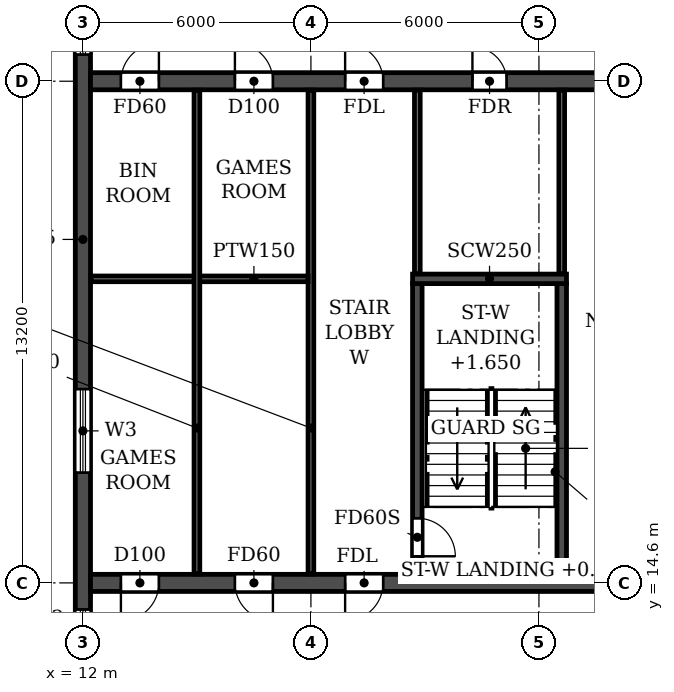
"""IFC4 building model, lengths in metres.
Left out: names, types, materials, properties, quantities, classifications, styles, units other than length and angle.
Written with IfcOpenShell. Run it as: python <this file> out.ifc"""

import sys

from ifc_helpers import new_model, si_unit, direction, frame, frame_2d, origin, place, context, subcontext, project, spatial, rectangle, extrude, element, fill, save


model = new_model("IFC4")
c1 = context("Model", 3, precision=1e-05, world=origin(), true_north=direction((0.0, 1.0)))
c2 = subcontext(c1, "Body", "Model", "MODEL_VIEW")
j1 = project(units=[si_unit("LENGTHUNIT", "METRE"), si_unit("PLANEANGLEUNIT", "RADIAN")], contexts=[c1])
p1 = place(None, origin())
s1 = spatial("IfcSite", under=j1, at=p1, CompositionType="ELEMENT")
p2 = place(p1, origin())
s2 = spatial("IfcBuilding", under=s1, at=p2, CompositionType="ELEMENT")
p3 = place(p2, frame((0.0, 0.0, 125.7)))
s3 = spatial("IfcBuildingStorey", under=s2, at=p3, CompositionType="ELEMENT", Elevation=125.7)
p4 = place(p3, frame((12.0, 4.683, 0.0), z_axis=(0.0, 0.0, 1.0), x_axis=(0.0, 1.0, 0.0)))
e1 = element("IfcWall", 1, at=p4, inside=s3, PredefinedType="SHEAR", context=c2, shape_type="SweptSolid", body=[
    extrude(rectangle(XDim=33.034, YDim=0.4, at=frame_2d((16.517, 0.0))), origin(), (0.0, 0.0, 1.0), 3.07),
])
p5 = place(p4, frame((23.817, 0.0, 0.9)))
e2 = element("IfcOpeningElement", 2, at=p5, cuts=e1, PredefinedType="OPENING", context=c2, shape_type="SweptSolid", body=[
    extrude(rectangle(XDim=1.2, YDim=1.5, at=frame_2d((0.6, 0.75))), frame((0.0, 0.21, 0.0), z_axis=(0.0, -1.0, 0.0), x_axis=(1.0, 0.0, 0.0)), (0.0, 0.0, 1.0), 0.42),
])
p6 = place(p4, frame((8.017, 0.0, 0.9)))
e3 = element("IfcOpeningElement", 3, at=p6, cuts=e1, PredefinedType="OPENING", context=c2, shape_type="SweptSolid", body=[
    extrude(rectangle(XDim=1.2, YDim=1.5, at=frame_2d((0.6, 0.75))), frame((0.0, 0.21, 0.0), z_axis=(0.0, -1.0, 0.0), x_axis=(1.0, 0.0, 0.0)), (0.0, 0.0, 1.0), 0.42),
])
p7 = place(p4, frame((28.293, 0.0, 0.6)))
e4 = element("IfcOpeningElement", 4, at=p7, cuts=e1, PredefinedType="OPENING", context=c2, shape_type="SweptSolid", body=[
    extrude(rectangle(XDim=2.2, YDim=1.8, at=frame_2d((1.1, 0.9))), frame((0.0, 0.21, 0.0), z_axis=(0.0, -1.0, 0.0), x_axis=(1.0, 0.0, 0.0)), (0.0, 0.0, 1.0), 0.42),
])
p8 = place(p4, frame((2.541, 0.0, 0.6)))
e5 = element("IfcOpeningElement", 5, at=p8, cuts=e1, PredefinedType="OPENING", context=c2, shape_type="SweptSolid", body=[
    extrude(rectangle(XDim=2.2, YDim=1.8, at=frame_2d((1.1, 0.9))), frame((0.0, 0.21, 0.0), z_axis=(0.0, -1.0, 0.0), x_axis=(1.0, 0.0, 0.0)), (0.0, 0.0, 1.0), 0.42),
])
p9 = place(p4, frame((12.817, 0.0, 0.6)))
e6 = element("IfcOpeningElement", 6, at=p9, cuts=e1, PredefinedType="OPENING", context=c2, shape_type="SweptSolid", body=[
    extrude(rectangle(XDim=2.2, YDim=1.8, at=frame_2d((1.1, 0.9))), frame((0.0, 0.21, 0.0), z_axis=(0.0, -1.0, 0.0), x_axis=(1.0, 0.0, 0.0)), (0.0, 0.0, 1.0), 0.42),
])
p10 = place(p3, frame((12.2, 14.6, 0.0), z_axis=(0.0, 0.0, 1.0), x_axis=(1.0, 0.0, 0.0)))
e7 = element("IfcWall", 7, at=p10, inside=s3, PredefinedType="SOLIDWALL", context=c2, shape_type="SweptSolid", body=[
    extrude(rectangle(XDim=77.6, YDim=0.45, at=frame_2d((38.8, 0.0))), origin(), (0.0, 0.0, 1.0), 3.07),
])
p11 = place(p10, frame((0.8, 0.0, 0.0)))
e8 = element("IfcOpeningElement", 8, at=p11, cuts=e7, PredefinedType="OPENING", context=c2, shape_type="SweptSolid", body=[
    extrude(rectangle(XDim=1.0, YDim=2.1, at=frame_2d((0.5, 1.05))), frame((0.0, 0.235, 0.0), z_axis=(0.0, -1.0, 0.0), x_axis=(1.0, 0.0, 0.0)), (0.0, 0.0, 1.0), 0.47),
])
p12 = place(p10, frame((3.8, 0.0, 0.0)))
e9 = element("IfcOpeningElement", 9, at=p12, cuts=e7, PredefinedType="OPENING", context=c2, shape_type="SweptSolid", body=[
    extrude(rectangle(XDim=1.0, YDim=2.1, at=frame_2d((0.5, 1.05))), frame((0.0, 0.235, 0.0), z_axis=(0.0, -1.0, 0.0), x_axis=(1.0, 0.0, 0.0)), (0.0, 0.0, 1.0), 0.47),
])
p13 = place(p10, frame((6.7, 0.0, 0.0)))
e10 = element("IfcOpeningElement", 10, at=p13, cuts=e7, PredefinedType="OPENING", context=c2, shape_type="SweptSolid", body=[
    extrude(rectangle(XDim=1.0, YDim=2.1, at=frame_2d((0.5, 1.05))), frame((0.0, 0.235, 0.0), z_axis=(0.0, -1.0, 0.0), x_axis=(1.0, 0.0, 0.0)), (0.0, 0.0, 1.0), 0.47),
])
p14 = place(p10, frame((14.6, 0.0, 0.0)))
e11 = element("IfcOpeningElement", 11, at=p14, cuts=e7, PredefinedType="OPENING", context=c2, shape_type="SweptSolid", body=[
    extrude(rectangle(XDim=1.0, YDim=2.1, at=frame_2d((0.5, 1.05))), frame((0.0, 0.235, 0.0), z_axis=(0.0, -1.0, 0.0), x_axis=(1.0, 0.0, 0.0)), (0.0, 0.0, 1.0), 0.47),
])
p15 = place(p10, frame((19.2, 0.0, 0.0)))
e12 = element("IfcOpeningElement", 12, at=p15, cuts=e7, PredefinedType="OPENING", context=c2, shape_type="SweptSolid", body=[
    extrude(rectangle(XDim=1.0, YDim=2.1, at=frame_2d((0.5, 1.05))), frame((0.0, 0.235, 0.0), z_axis=(0.0, -1.0, 0.0), x_axis=(1.0, 0.0, 0.0)), (0.0, 0.0, 1.0), 0.47),
])
p16 = place(p10, frame((30.5, 0.0, 0.0)))
e13 = element("IfcOpeningElement", 13, at=p16, cuts=e7, PredefinedType="OPENING", context=c2, shape_type="SweptSolid", body=[
    extrude(rectangle(XDim=1.0, YDim=2.1, at=frame_2d((0.5, 1.05))), frame((0.0, 0.235, 0.0), z_axis=(0.0, -1.0, 0.0), x_axis=(1.0, 0.0, 0.0)), (0.0, 0.0, 1.0), 0.47),
])
p17 = place(p10, frame((34.4, 0.0, 0.0)))
e14 = element("IfcOpeningElement", 14, at=p17, cuts=e7, PredefinedType="OPENING", context=c2, shape_type="SweptSolid", body=[
    extrude(rectangle(XDim=1.0, YDim=2.1, at=frame_2d((0.5, 1.05))), frame((0.0, 0.235, 0.0), z_axis=(0.0, -1.0, 0.0), x_axis=(1.0, 0.0, 0.0)), (0.0, 0.0, 1.0), 0.47),
])
p18 = place(p10, frame((38.3, 0.0, 0.0)))
e15 = element("IfcOpeningElement", 15, at=p18, cuts=e7, PredefinedType="OPENING", context=c2, shape_type="SweptSolid", body=[
    extrude(rectangle(XDim=1.0, YDim=2.1, at=frame_2d((0.5, 1.05))), frame((0.0, 0.235, 0.0), z_axis=(0.0, -1.0, 0.0), x_axis=(1.0, 0.0, 0.0)), (0.0, 0.0, 1.0), 0.47),
])
p19 = place(p10, frame((40.9, 0.0, 0.0)))
e16 = element("IfcOpeningElement", 16, at=p19, cuts=e7, PredefinedType="OPENING", context=c2, shape_type="SweptSolid", body=[
    extrude(rectangle(XDim=1.0, YDim=2.1, at=frame_2d((0.5, 1.05))), frame((0.0, 0.235, 0.0), z_axis=(0.0, -1.0, 0.0), x_axis=(1.0, 0.0, 0.0)), (0.0, 0.0, 1.0), 0.47),
])
p20 = place(p10, frame((44.8, 0.0, 0.0)))
e17 = element("IfcOpeningElement", 17, at=p20, cuts=e7, PredefinedType="OPENING", context=c2, shape_type="SweptSolid", body=[
    extrude(rectangle(XDim=1.0, YDim=2.1, at=frame_2d((0.5, 1.05))), frame((0.0, 0.235, 0.0), z_axis=(0.0, -1.0, 0.0), x_axis=(1.0, 0.0, 0.0)), (0.0, 0.0, 1.0), 0.47),
])
p21 = place(p10, frame((57.4, 0.0, 0.0)))
e18 = element("IfcOpeningElement", 18, at=p21, cuts=e7, PredefinedType="OPENING", context=c2, shape_type="SweptSolid", body=[
    extrude(rectangle(XDim=1.0, YDim=2.1, at=frame_2d((0.5, 1.05))), frame((0.0, 0.235, 0.0), z_axis=(0.0, -1.0, 0.0), x_axis=(1.0, 0.0, 0.0)), (0.0, 0.0, 1.0), 0.47),
])
p22 = place(p10, frame((62.0, 0.0, 0.0)))
e19 = element("IfcOpeningElement", 19, at=p22, cuts=e7, PredefinedType="OPENING", context=c2, shape_type="SweptSolid", body=[
    extrude(rectangle(XDim=1.0, YDim=2.1, at=frame_2d((0.5, 1.05))), frame((0.0, 0.235, 0.0), z_axis=(0.0, -1.0, 0.0), x_axis=(1.0, 0.0, 0.0)), (0.0, 0.0, 1.0), 0.47),
])
p23 = place(p10, frame((69.9, 0.0, 0.0)))
e20 = element("IfcOpeningElement", 20, at=p23, cuts=e7, PredefinedType="OPENING", context=c2, shape_type="SweptSolid", body=[
    extrude(rectangle(XDim=1.0, YDim=2.1, at=frame_2d((0.5, 1.05))), frame((0.0, 0.235, 0.0), z_axis=(0.0, -1.0, 0.0), x_axis=(1.0, 0.0, 0.0)), (0.0, 0.0, 1.0), 0.47),
])
p24 = place(p10, frame((72.8, 0.0, 0.0)))
e21 = element("IfcOpeningElement", 21, at=p24, cuts=e7, PredefinedType="OPENING", context=c2, shape_type="SweptSolid", body=[
    extrude(rectangle(XDim=1.0, YDim=2.1, at=frame_2d((0.5, 1.05))), frame((0.0, 0.235, 0.0), z_axis=(0.0, -1.0, 0.0), x_axis=(1.0, 0.0, 0.0)), (0.0, 0.0, 1.0), 0.47),
])
p25 = place(p10, frame((75.8, 0.0, 0.0)))
e22 = element("IfcOpeningElement", 22, at=p25, cuts=e7, PredefinedType="OPENING", context=c2, shape_type="SweptSolid", body=[
    extrude(rectangle(XDim=1.0, YDim=2.1, at=frame_2d((0.5, 1.05))), frame((0.0, 0.235, 0.0), z_axis=(0.0, -1.0, 0.0), x_axis=(1.0, 0.0, 0.0)), (0.0, 0.0, 1.0), 0.47),
])
p26 = place(p3, frame((12.2, 27.8, 0.0), z_axis=(0.0, 0.0, 1.0), x_axis=(1.0, 0.0, 0.0)))
e23 = element("IfcWall", 23, at=p26, inside=s3, PredefinedType="SOLIDWALL", context=c2, shape_type="SweptSolid", body=[
    extrude(rectangle(XDim=77.6, YDim=0.45, at=frame_2d((38.8, 0.0))), origin(), (0.0, 0.0, 1.0), 3.07),
])
p27 = place(p26, frame((0.8, 0.0, 0.0)))
e24 = element("IfcOpeningElement", 24, at=p27, cuts=e23, PredefinedType="OPENING", context=c2, shape_type="SweptSolid", body=[
    extrude(rectangle(XDim=1.0, YDim=2.1, at=frame_2d((0.5, 1.05))), frame((0.0, 0.235, 0.0), z_axis=(0.0, -1.0, 0.0), x_axis=(1.0, 0.0, 0.0)), (0.0, 0.0, 1.0), 0.47),
])
p28 = place(p26, frame((3.8, 0.0, 0.0)))
e25 = element("IfcOpeningElement", 25, at=p28, cuts=e23, PredefinedType="OPENING", context=c2, shape_type="SweptSolid", body=[
    extrude(rectangle(XDim=1.0, YDim=2.1, at=frame_2d((0.5, 1.05))), frame((0.0, 0.235, 0.0), z_axis=(0.0, -1.0, 0.0), x_axis=(1.0, 0.0, 0.0)), (0.0, 0.0, 1.0), 0.47),
])
p29 = place(p26, frame((6.7, 0.0, 0.0)))
e26 = element("IfcOpeningElement", 26, at=p29, cuts=e23, PredefinedType="OPENING", context=c2, shape_type="SweptSolid", body=[
    extrude(rectangle(XDim=1.0, YDim=2.1, at=frame_2d((0.5, 1.05))), frame((0.0, 0.235, 0.0), z_axis=(0.0, -1.0, 0.0), x_axis=(1.0, 0.0, 0.0)), (0.0, 0.0, 1.0), 0.47),
])
p30 = place(p26, frame((10.05, 0.0, 0.0)))
e27 = element("IfcOpeningElement", 27, at=p30, cuts=e23, PredefinedType="OPENING", context=c2, shape_type="SweptSolid", body=[
    extrude(rectangle(XDim=0.9, YDim=2.1, at=frame_2d((0.45, 1.05))), frame((0.0, 0.235, 0.0), z_axis=(0.0, -1.0, 0.0), x_axis=(1.0, 0.0, 0.0)), (0.0, 0.0, 1.0), 0.47),
])
p31 = place(p26, frame((19.25, 0.0, 0.0)))
e28 = element("IfcOpeningElement", 28, at=p31, cuts=e23, PredefinedType="OPENING", context=c2, shape_type="SweptSolid", body=[
    extrude(rectangle(XDim=0.9, YDim=2.1, at=frame_2d((0.45, 1.05))), frame((0.0, 0.235, 0.0), z_axis=(0.0, -1.0, 0.0), x_axis=(1.0, 0.0, 0.0)), (0.0, 0.0, 1.0), 0.47),
])
p32 = place(p26, frame((25.0, 0.0, 0.0)))
e29 = element("IfcOpeningElement", 29, at=p32, cuts=e23, PredefinedType="OPENING", context=c2, shape_type="SweptSolid", body=[
    extrude(rectangle(XDim=1.0, YDim=2.1, at=frame_2d((0.5, 1.05))), frame((0.0, 0.235, 0.0), z_axis=(0.0, -1.0, 0.0), x_axis=(1.0, 0.0, 0.0)), (0.0, 0.0, 1.0), 0.47),
])
p33 = place(p26, frame((30.2, 0.0, 0.0)))
e30 = element("IfcOpeningElement", 30, at=p33, cuts=e23, PredefinedType="OPENING", context=c2, shape_type="SweptSolid", body=[
    extrude(rectangle(XDim=1.0, YDim=2.1, at=frame_2d((0.5, 1.05))), frame((0.0, 0.235, 0.0), z_axis=(0.0, -1.0, 0.0), x_axis=(1.0, 0.0, 0.0)), (0.0, 0.0, 1.0), 0.47),
])
p34 = place(p26, frame((35.4, 0.0, 0.0)))
e31 = element("IfcOpeningElement", 31, at=p34, cuts=e23, PredefinedType="OPENING", context=c2, shape_type="SweptSolid", body=[
    extrude(rectangle(XDim=1.0, YDim=2.1, at=frame_2d((0.5, 1.05))), frame((0.0, 0.235, 0.0), z_axis=(0.0, -1.0, 0.0), x_axis=(1.0, 0.0, 0.0)), (0.0, 0.0, 1.0), 0.47),
])
p35 = place(p26, frame((38.3, 0.0, 0.0)))
e32 = element("IfcOpeningElement", 32, at=p35, cuts=e23, PredefinedType="OPENING", context=c2, shape_type="SweptSolid", body=[
    extrude(rectangle(XDim=1.0, YDim=2.1, at=frame_2d((0.5, 1.05))), frame((0.0, 0.235, 0.0), z_axis=(0.0, -1.0, 0.0), x_axis=(1.0, 0.0, 0.0)), (0.0, 0.0, 1.0), 0.47),
])
p36 = place(p26, frame((42.5, 0.0, 0.0)))
e33 = element("IfcOpeningElement", 33, at=p36, cuts=e23, PredefinedType="OPENING", context=c2, shape_type="SweptSolid", body=[
    extrude(rectangle(XDim=1.0, YDim=2.1, at=frame_2d((0.5, 1.05))), frame((0.0, 0.235, 0.0), z_axis=(0.0, -1.0, 0.0), x_axis=(1.0, 0.0, 0.0)), (0.0, 0.0, 1.0), 0.47),
])
p37 = place(p26, frame((46.4, 0.0, 0.0)))
e34 = element("IfcOpeningElement", 34, at=p37, cuts=e23, PredefinedType="OPENING", context=c2, shape_type="SweptSolid", body=[
    extrude(rectangle(XDim=1.0, YDim=2.1, at=frame_2d((0.5, 1.05))), frame((0.0, 0.235, 0.0), z_axis=(0.0, -1.0, 0.0), x_axis=(1.0, 0.0, 0.0)), (0.0, 0.0, 1.0), 0.47),
])
p38 = place(p26, frame((49.0, 0.0, 0.0)))
e35 = element("IfcOpeningElement", 35, at=p38, cuts=e23, PredefinedType="OPENING", context=c2, shape_type="SweptSolid", body=[
    extrude(rectangle(XDim=1.0, YDim=2.1, at=frame_2d((0.5, 1.05))), frame((0.0, 0.235, 0.0), z_axis=(0.0, -1.0, 0.0), x_axis=(1.0, 0.0, 0.0)), (0.0, 0.0, 1.0), 0.47),
])
p39 = place(p26, frame((52.65, 0.0, 0.0)))
e36 = element("IfcOpeningElement", 36, at=p39, cuts=e23, PredefinedType="OPENING", context=c2, shape_type="SweptSolid", body=[
    extrude(rectangle(XDim=1.5, YDim=2.1, at=frame_2d((0.75, 1.05))), frame((0.0, 0.235, 0.0), z_axis=(0.0, -1.0, 0.0), x_axis=(1.0, 0.0, 0.0)), (0.0, 0.0, 1.0), 0.47),
])
p40 = place(p26, frame((57.45, 0.0, 0.0)))
e37 = element("IfcOpeningElement", 37, at=p40, cuts=e23, PredefinedType="OPENING", context=c2, shape_type="SweptSolid", body=[
    extrude(rectangle(XDim=0.9, YDim=2.1, at=frame_2d((0.45, 1.05))), frame((0.0, 0.235, 0.0), z_axis=(0.0, -1.0, 0.0), x_axis=(1.0, 0.0, 0.0)), (0.0, 0.0, 1.0), 0.47),
])
p41 = place(p26, frame((66.65, 0.0, 0.0)))
e38 = element("IfcOpeningElement", 38, at=p41, cuts=e23, PredefinedType="OPENING", context=c2, shape_type="SweptSolid", body=[
    extrude(rectangle(XDim=0.9, YDim=2.1, at=frame_2d((0.45, 1.05))), frame((0.0, 0.235, 0.0), z_axis=(0.0, -1.0, 0.0), x_axis=(1.0, 0.0, 0.0)), (0.0, 0.0, 1.0), 0.47),
])
p42 = place(p26, frame((69.9, 0.0, 0.0)))
e39 = element("IfcOpeningElement", 39, at=p42, cuts=e23, PredefinedType="OPENING", context=c2, shape_type="SweptSolid", body=[
    extrude(rectangle(XDim=1.0, YDim=2.1, at=frame_2d((0.5, 1.05))), frame((0.0, 0.235, 0.0), z_axis=(0.0, -1.0, 0.0), x_axis=(1.0, 0.0, 0.0)), (0.0, 0.0, 1.0), 0.47),
])
p43 = place(p26, frame((72.8, 0.0, 0.0)))
e40 = element("IfcOpeningElement", 40, at=p43, cuts=e23, PredefinedType="OPENING", context=c2, shape_type="SweptSolid", body=[
    extrude(rectangle(XDim=1.0, YDim=2.1, at=frame_2d((0.5, 1.05))), frame((0.0, 0.235, 0.0), z_axis=(0.0, -1.0, 0.0), x_axis=(1.0, 0.0, 0.0)), (0.0, 0.0, 1.0), 0.47),
])
p44 = place(p26, frame((75.8, 0.0, 0.0)))
e41 = element("IfcOpeningElement", 41, at=p44, cuts=e23, PredefinedType="OPENING", context=c2, shape_type="SweptSolid", body=[
    extrude(rectangle(XDim=1.0, YDim=2.1, at=frame_2d((0.5, 1.05))), frame((0.0, 0.235, 0.0), z_axis=(0.0, -1.0, 0.0), x_axis=(1.0, 0.0, 0.0)), (0.0, 0.0, 1.0), 0.47),
])
p45 = place(p3, frame((20.8, 14.825, 0.0), z_axis=(0.0, 0.0, 1.0), x_axis=(0.0, 1.0, 0.0)))
e42 = element("IfcWall", 42, at=p45, inside=s3, PredefinedType="SOLIDWALL", context=c2, shape_type="SweptSolid", body=[
    extrude(rectangle(XDim=7.65, YDim=0.25, at=frame_2d((3.825, 0.0))), origin(), (0.0, 0.0, 1.0), 3.07),
])
p46 = place(p45, frame((0.475, 0.0, 0.0)))
e43 = element("IfcOpeningElement", 43, at=p46, cuts=e42, PredefinedType="OPENING", context=c2, shape_type="SweptSolid", body=[
    extrude(rectangle(XDim=1.0, YDim=2.1, at=frame_2d((0.5, 1.05))), frame((0.0, 0.135, 0.0), z_axis=(0.0, -1.0, 0.0), x_axis=(1.0, 0.0, 0.0)), (0.0, 0.0, 1.0), 0.27),
])
p47 = place(p3, frame((24.6, 14.825, 0.0), z_axis=(0.0, 0.0, 1.0), x_axis=(0.0, 1.0, 0.0)))
e44 = element("IfcWall", 44, at=p47, inside=s3, PredefinedType="SOLIDWALL", context=c2, shape_type="SweptSolid", body=[
    extrude(rectangle(XDim=7.65, YDim=0.25, at=frame_2d((3.825, 0.0))), origin(), (0.0, 0.0, 1.0), 3.07),
])
p48 = place(p3, frame((20.675, 22.6, 0.0), z_axis=(0.0, 0.0, 1.0), x_axis=(1.0, 0.0, 0.0)))
e45 = element("IfcWall", 45, at=p48, inside=s3, PredefinedType="SOLIDWALL", context=c2, shape_type="SweptSolid", body=[
    extrude(rectangle(XDim=4.05, YDim=0.25, at=frame_2d((2.025, 0.0))), origin(), (0.0, 0.0, 1.0), 3.07),
])
p49 = place(p3, frame((18.0, 14.835, 0.0), z_axis=(0.0, 0.0, 1.0), x_axis=(0.0, 1.0, 0.0)))
e46 = element("IfcWall", 46, at=p49, inside=s3, PredefinedType="PARTITIONING", context=c2, shape_type="SweptSolid", body=[
    extrude(rectangle(XDim=12.73, YDim=0.15, at=frame_2d((6.365, 0.0))), origin(), (0.0, 0.0, 1.0), 3.07),
])
p50 = place(p3, frame((12.21, 22.6, 0.0), z_axis=(0.0, 0.0, 1.0), x_axis=(1.0, 0.0, 0.0)))
e47 = element("IfcWall", 47, at=p50, inside=s3, PredefinedType="PARTITIONING", context=c2, shape_type="SweptSolid", body=[
    extrude(rectangle(XDim=5.715, YDim=0.15, at=frame_2d((2.857, 0.0))), origin(), (0.0, 0.0, 1.0), 3.07),
])
p51 = place(p3, frame((15.0, 14.835, 0.0), z_axis=(0.0, 0.0, 1.0), x_axis=(0.0, 1.0, 0.0)))
e48 = element("IfcWall", 48, at=p51, inside=s3, PredefinedType="PARTITIONING", context=c2, shape_type="SweptSolid", body=[
    extrude(rectangle(XDim=12.73, YDim=0.15, at=frame_2d((6.365, 0.0))), origin(), (0.0, 0.0, 1.0), 3.07),
])
for number, where, z_axis, x_axis in (
    (49, (20.8, 22.735, 0.0), (0.0, 0.0, 1.0), (0.0, 1.0, 0.0)),
    (50, (24.6, 22.735, 0.0), (0.0, 0.0, 1.0), (0.0, 1.0, 0.0)),
):
    element("IfcWall", number, at=place(p3, frame(where, z_axis=z_axis, x_axis=x_axis)), inside=s3, PredefinedType="PARTITIONING", context=c2, shape_type="SweptSolid", body=[
        extrude(rectangle(XDim=4.83, YDim=0.15, at=frame_2d((2.415, 0.0))), origin(), (0.0, 0.0, 1.0), 3.07),
    ])
p52 = place(p5, origin())
e51 = element("IfcWindow", 51, at=p52, inside=s3, PartitioningType="SINGLE_PANEL", PredefinedType="WINDOW", context=c2, shape_type="SweptSolid", body=[
    extrude(rectangle(XDim=1.2, YDim=1.5, at=frame_2d((0.6, 0.75))), frame((0.0, 0.03, 0.0), z_axis=(0.0, -1.0, 0.0), x_axis=(1.0, 0.0, 0.0)), (0.0, 0.0, 1.0), 0.06),
])
fill(e2, e51)
p53 = place(p6, origin())
e52 = element("IfcWindow", 52, at=p53, inside=s3, PartitioningType="SINGLE_PANEL", PredefinedType="WINDOW", context=c2, shape_type="SweptSolid", body=[
    extrude(rectangle(XDim=1.2, YDim=1.5, at=frame_2d((0.6, 0.75))), frame((0.0, 0.03, 0.0), z_axis=(0.0, -1.0, 0.0), x_axis=(1.0, 0.0, 0.0)), (0.0, 0.0, 1.0), 0.06),
])
fill(e3, e52)
p54 = place(p9, origin())
e53 = element("IfcWindow", 53, at=p54, inside=s3, PartitioningType="DOUBLE_PANEL_HORIZONTAL", PredefinedType="WINDOW", context=c2, shape_type="SweptSolid", body=[
    extrude(rectangle(XDim=2.2, YDim=1.8, at=frame_2d((1.1, 0.9))), frame((0.0, 0.03, 0.0), z_axis=(0.0, -1.0, 0.0), x_axis=(1.0, 0.0, 0.0)), (0.0, 0.0, 1.0), 0.06),
])
fill(e6, e53)
p55 = place(p27, origin())
e54 = element("IfcDoor", 54, at=p55, inside=s3, OperationType="SINGLE_SWING_RIGHT", PredefinedType="DOOR", context=c2, shape_type="SweptSolid", body=[
    extrude(rectangle(XDim=1.0, YDim=2.1, at=frame_2d((0.5, 1.05))), frame((0.0, 0.025, 0.0), z_axis=(0.0, -1.0, 0.0), x_axis=(1.0, 0.0, 0.0)), (0.0, 0.0, 1.0), 0.05),
])
fill(e24, e54)
p56 = place(p28, origin())
e55 = element("IfcDoor", 55, at=p56, inside=s3, OperationType="SINGLE_SWING_LEFT", PredefinedType="DOOR", context=c2, shape_type="SweptSolid", body=[
    extrude(rectangle(XDim=1.0, YDim=2.1, at=frame_2d((0.5, 1.05))), frame((0.0, 0.025, 0.0), z_axis=(0.0, -1.0, 0.0), x_axis=(1.0, 0.0, 0.0)), (0.0, 0.0, 1.0), 0.05),
])
fill(e25, e55)
p57 = place(p29, origin())
e56 = element("IfcDoor", 56, at=p57, inside=s3, OperationType="SINGLE_SWING_LEFT", PredefinedType="DOOR", context=c2, shape_type="SweptSolid", body=[
    extrude(rectangle(XDim=1.0, YDim=2.1, at=frame_2d((0.5, 1.05))), frame((0.0, 0.025, 0.0), z_axis=(0.0, -1.0, 0.0), x_axis=(1.0, 0.0, 0.0)), (0.0, 0.0, 1.0), 0.05),
])
fill(e26, e56)
p58 = place(p30, origin())
e57 = element("IfcDoor", 57, at=p58, inside=s3, OperationType="SINGLE_SWING_LEFT", PredefinedType="DOOR", context=c2, shape_type="SweptSolid", body=[
    extrude(rectangle(XDim=0.9, YDim=2.1, at=frame_2d((0.45, 1.05))), frame((0.0, 0.025, 0.0), z_axis=(0.0, -1.0, 0.0), x_axis=(1.0, 0.0, 0.0)), (0.0, 0.0, 1.0), 0.05),
])
fill(e27, e57)
p59 = place(p11, frame((1.0, 0.0, 0.0), z_axis=(0.0, 0.0, 1.0), x_axis=(-1.0, 0.0, 0.0)))
e58 = element("IfcDoor", 58, at=p59, inside=s3, OperationType="SINGLE_SWING_RIGHT", PredefinedType="DOOR", context=c2, shape_type="SweptSolid", body=[
    extrude(rectangle(XDim=1.0, YDim=2.1, at=frame_2d((0.5, 1.05))), frame((0.0, 0.025, 0.0), z_axis=(0.0, -1.0, 0.0), x_axis=(1.0, 0.0, 0.0)), (0.0, 0.0, 1.0), 0.05),
])
fill(e8, e58)
p60 = place(p12, frame((1.0, 0.0, 0.0), z_axis=(0.0, 0.0, 1.0), x_axis=(-1.0, 0.0, 0.0)))
e59 = element("IfcDoor", 59, at=p60, inside=s3, OperationType="SINGLE_SWING_LEFT", PredefinedType="DOOR", context=c2, shape_type="SweptSolid", body=[
    extrude(rectangle(XDim=1.0, YDim=2.1, at=frame_2d((0.5, 1.05))), frame((0.0, 0.025, 0.0), z_axis=(0.0, -1.0, 0.0), x_axis=(1.0, 0.0, 0.0)), (0.0, 0.0, 1.0), 0.05),
])
fill(e9, e59)
p61 = place(p13, frame((1.0, 0.0, 0.0), z_axis=(0.0, 0.0, 1.0), x_axis=(-1.0, 0.0, 0.0)))
e60 = element("IfcDoor", 60, at=p61, inside=s3, OperationType="SINGLE_SWING_RIGHT", PredefinedType="DOOR", context=c2, shape_type="SweptSolid", body=[
    extrude(rectangle(XDim=1.0, YDim=2.1, at=frame_2d((0.5, 1.05))), frame((0.0, 0.025, 0.0), z_axis=(0.0, -1.0, 0.0), x_axis=(1.0, 0.0, 0.0)), (0.0, 0.0, 1.0), 0.05),
])
fill(e10, e60)
p62 = place(p46, frame((1.0, 0.0, 0.0), z_axis=(0.0, 0.0, 1.0), x_axis=(-1.0, 0.0, 0.0)))
e61 = element("IfcDoor", 61, at=p62, inside=s3, OperationType="SINGLE_SWING_RIGHT", PredefinedType="DOOR", context=c2, shape_type="SweptSolid", body=[
    extrude(rectangle(XDim=1.0, YDim=2.1, at=frame_2d((0.5, 1.05))), frame((0.0, 0.025, 0.0), z_axis=(0.0, -1.0, 0.0), x_axis=(1.0, 0.0, 0.0)), (0.0, 0.0, 1.0), 0.05),
])
fill(e43, e61)
save(model, sys.argv[1])
